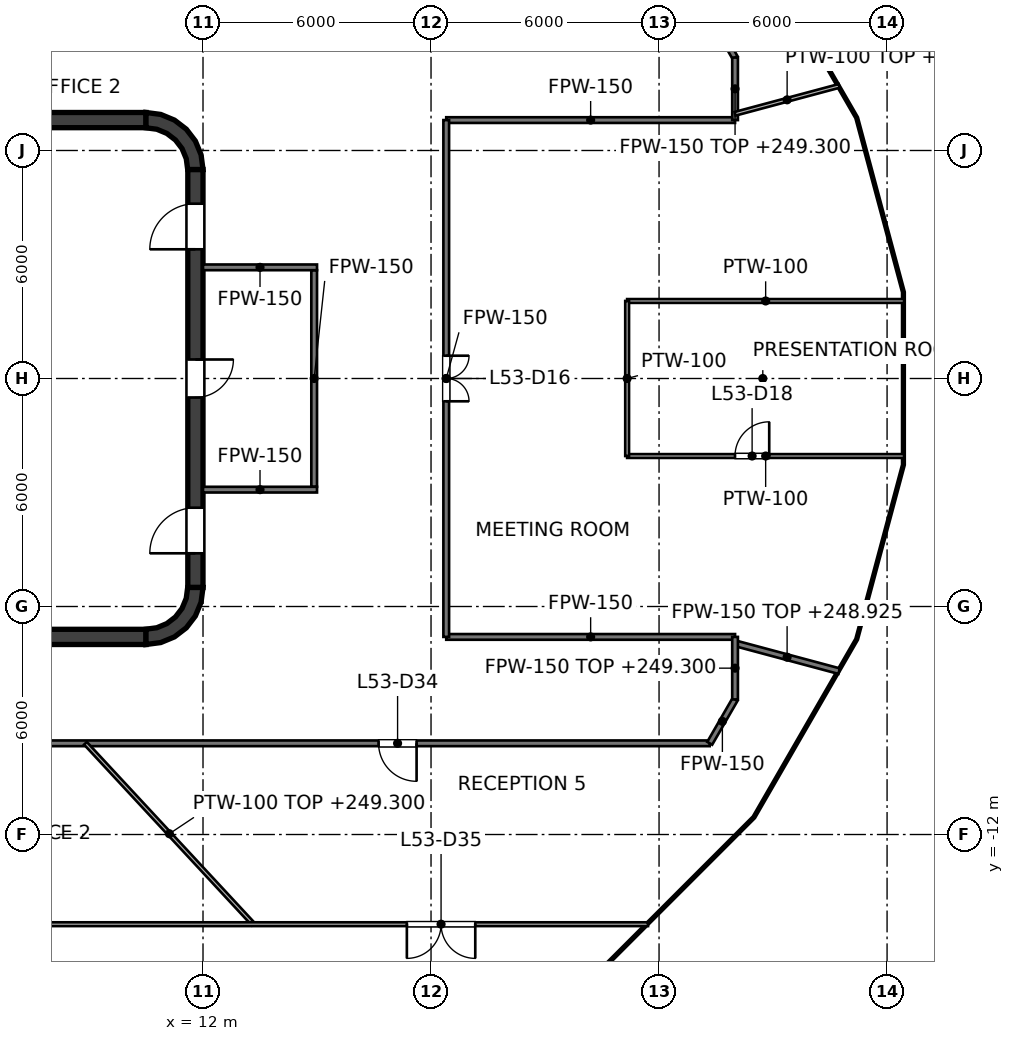
"""IFC4 building model, lengths in metres.
Left out: names, types, materials, properties, quantities, classifications, styles, units other than length and angle.
Written with IfcOpenShell. Run it as: python <this file> out.ifc"""

import sys

from ifc_helpers import new_model, si_unit, direction, frame, frame_2d, origin, place, context, subcontext, project, spatial, polyline, rectangle, outline, extrude, element, fill, save


model = new_model("IFC4")
c1 = context("Model", 3, precision=1e-05, world=origin(), true_north=direction((0.0, 1.0)))
c2 = subcontext(c1, "Body", "Model", "MODEL_VIEW")
j1 = project(units=[si_unit("LENGTHUNIT", "METRE"), si_unit("PLANEANGLEUNIT", "RADIAN")], contexts=[c1])
p1 = place(None, origin())
s1 = spatial("IfcSite", under=j1, at=p1, CompositionType="ELEMENT")
p2 = place(p1, origin())
s2 = spatial("IfcBuilding", under=s1, at=p2, CompositionType="ELEMENT")
p3 = place(p2, frame((0.0, 0.0, 245.6)))
s3 = spatial("IfcBuildingStorey", under=s2, at=p3, CompositionType="ELEMENT", Elevation=245.6)
for number, where, z_axis, x_axis in (
    (1, (-10.5, 6.8, 0.0), (0.0, 0.0, 1.0), (1.0, 0.0, 0.0)),
    (2, (-10.5, -6.8, 0.0), (0.0, 0.0, 1.0), (1.0, 0.0, 0.0)),
):
    element("IfcWall", number, at=place(p3, frame(where, z_axis=z_axis, x_axis=x_axis)), inside=s3, PredefinedType="SHEAR", context=c2, shape_type="SweptSolid", body=[
        extrude(rectangle(XDim=21.0, YDim=0.4, at=frame_2d((10.5, 0.0))), origin(), (0.0, 0.0, 1.0), 4.0),
    ])
p4 = place(p3, frame((11.8, -5.5, 0.0), z_axis=(0.0, 0.0, 1.0), x_axis=(0.0, 1.0, 0.0)))
e3 = element("IfcWall", 3, at=p4, inside=s3, PredefinedType="SHEAR", context=c2, shape_type="SweptSolid", body=[
    extrude(rectangle(XDim=11.0, YDim=0.4, at=frame_2d((5.5, 0.0))), origin(), (0.0, 0.0, 1.0), 4.0),
])
p5 = place(p4, frame((5.0, 0.0, 0.0)))
e4 = element("IfcOpeningElement", 4, at=p5, cuts=e3, PredefinedType="OPENING", context=c2, shape_type="SweptSolid", body=[
    extrude(rectangle(XDim=1.0, YDim=2.1, at=frame_2d((0.5, 1.05))), frame((0.0, 0.2, 0.0), z_axis=(0.0, -1.0, 0.0), x_axis=(1.0, 0.0, 0.0)), (0.0, 0.0, 1.0), 0.4),
])
p6 = place(p4, frame((0.9, 0.0, 0.0)))
e5 = element("IfcOpeningElement", 5, at=p6, cuts=e3, PredefinedType="OPENING", context=c2, shape_type="SweptSolid", body=[
    extrude(rectangle(XDim=1.2, YDim=2.1, at=frame_2d((0.6, 1.05))), frame((0.0, 0.2, 0.0), z_axis=(0.0, -1.0, 0.0), x_axis=(1.0, 0.0, 0.0)), (0.0, 0.0, 1.0), 0.4),
])
p7 = place(p4, frame((8.9, 0.0, 0.0)))
e6 = element("IfcOpeningElement", 6, at=p7, cuts=e3, PredefinedType="OPENING", context=c2, shape_type="SweptSolid", body=[
    extrude(rectangle(XDim=1.2, YDim=2.1, at=frame_2d((0.6, 1.05))), frame((0.0, 0.2, 0.0), z_axis=(0.0, -1.0, 0.0), x_axis=(1.0, 0.0, 0.0)), (0.0, 0.0, 1.0), 0.4),
])
p8 = place(p3, origin())
e7 = element("IfcWall", 7, at=p8, inside=s3, PredefinedType="SHEAR", context=c2, shape_type="SweptSolid", body=[
    extrude(outline(polyline([(10.5, 7.0), (10.5, 6.596), (10.784, 6.559), (11.048, 6.45), (11.275, 6.275), (11.45, 6.048), (11.559, 5.784), (11.596, 5.5), (12.0, 5.5), (11.949, 5.888), (11.799, 6.25), (11.561, 6.561), (11.25, 6.799), (10.888, 6.949), (10.5, 7.0)])), origin(), (0.0, 0.0, 1.0), 4.0),
])
e8 = element("IfcWall", 8, at=p8, inside=s3, PredefinedType="SHEAR", context=c2, shape_type="SweptSolid", body=[
    extrude(outline(polyline([(12.0, -5.5), (11.596, -5.5), (11.559, -5.784), (11.45, -6.048), (11.275, -6.275), (11.048, -6.45), (10.784, -6.559), (10.5, -6.596), (10.5, -7.0), (10.888, -6.949), (11.25, -6.799), (11.561, -6.561), (11.799, -6.25), (11.949, -5.888), (12.0, -5.5)])), origin(), (0.0, 0.0, 1.0), 4.0),
])
p9 = place(p3, frame((9.0, 4.1, 0.0), z_axis=(0.0, 0.0, 1.0), x_axis=(0.0, 1.0, 0.0)))
e9 = element("IfcWall", 9, at=p9, inside=s3, PredefinedType="SOLIDWALL", context=c2, shape_type="SweptSolid", body=[
    extrude(rectangle(XDim=2.5, YDim=0.25, at=frame_2d((1.25, 0.0))), origin(), (0.0, 0.0, 1.0), 3.7),
])
p10 = place(p9, frame((0.65, 0.0, 0.0)))
e10 = element("IfcOpeningElement", 10, at=p10, cuts=e9, PredefinedType="OPENING", context=c2, shape_type="SweptSolid", body=[
    extrude(rectangle(XDim=1.2, YDim=2.1, at=frame_2d((0.6, 1.05))), frame((0.0, 0.125, 0.0), z_axis=(0.0, -1.0, 0.0), x_axis=(1.0, 0.0, 0.0)), (0.0, 0.0, 1.0), 0.25),
])
p11 = place(p3, frame((9.0, -6.6, 0.0), z_axis=(0.0, 0.0, 1.0), x_axis=(0.0, 1.0, 0.0)))
e11 = element("IfcWall", 11, at=p11, inside=s3, PredefinedType="SOLIDWALL", context=c2, shape_type="SweptSolid", body=[
    extrude(rectangle(XDim=2.5, YDim=0.25, at=frame_2d((1.25, 0.0))), origin(), (0.0, 0.0, 1.0), 3.7),
])
p12 = place(p11, frame((0.65, 0.0, 0.0)))
e12 = element("IfcOpeningElement", 12, at=p12, cuts=e11, PredefinedType="OPENING", context=c2, shape_type="SweptSolid", body=[
    extrude(rectangle(XDim=1.2, YDim=2.1, at=frame_2d((0.6, 1.05))), frame((0.0, 0.125, 0.0), z_axis=(0.0, -1.0, 0.0), x_axis=(1.0, 0.0, 0.0)), (0.0, 0.0, 1.0), 0.25),
])
p13 = place(p3, frame((0.775, 1.525, 0.0), z_axis=(0.0, 0.0, 1.0), x_axis=(1.0, 0.0, 0.0)))
e13 = element("IfcWall", 13, at=p13, inside=s3, PredefinedType="SOLIDWALL", context=c2, shape_type="SweptSolid", body=[
    extrude(rectangle(XDim=8.35, YDim=0.25, at=frame_2d((4.175, 0.0))), origin(), (0.0, 0.0, 1.0), 3.7),
])
p14 = place(p13, frame((0.925, 0.0, 0.0)))
e14 = element("IfcOpeningElement", 14, at=p14, cuts=e13, PredefinedType="OPENING", context=c2, shape_type="SweptSolid", body=[
    extrude(rectangle(XDim=1.1, YDim=2.1, at=frame_2d((0.55, 1.05))), frame((0.0, 0.125, 0.0), z_axis=(0.0, -1.0, 0.0), x_axis=(1.0, 0.0, 0.0)), (0.0, 0.0, 1.0), 0.25),
])
p15 = place(p13, frame((3.625, 0.0, 0.0)))
e15 = element("IfcOpeningElement", 15, at=p15, cuts=e13, PredefinedType="OPENING", context=c2, shape_type="SweptSolid", body=[
    extrude(rectangle(XDim=1.1, YDim=2.1, at=frame_2d((0.55, 1.05))), frame((0.0, 0.125, 0.0), z_axis=(0.0, -1.0, 0.0), x_axis=(1.0, 0.0, 0.0)), (0.0, 0.0, 1.0), 0.25),
])
p16 = place(p13, frame((6.325, 0.0, 0.0)))
e16 = element("IfcOpeningElement", 16, at=p16, cuts=e13, PredefinedType="OPENING", context=c2, shape_type="SweptSolid", body=[
    extrude(rectangle(XDim=1.1, YDim=2.1, at=frame_2d((0.55, 1.05))), frame((0.0, 0.125, 0.0), z_axis=(0.0, -1.0, 0.0), x_axis=(1.0, 0.0, 0.0)), (0.0, 0.0, 1.0), 0.25),
])
p17 = place(p3, frame((0.775, 3.975, 0.0), z_axis=(0.0, 0.0, 1.0), x_axis=(1.0, 0.0, 0.0)))
e17 = element("IfcWall", 17, at=p17, inside=s3, PredefinedType="SOLIDWALL", context=c2, shape_type="SweptSolid", body=[
    extrude(rectangle(XDim=8.35, YDim=0.25, at=frame_2d((4.175, 0.0))), origin(), (0.0, 0.0, 1.0), 3.7),
])
p18 = place(p3, frame((9.0, 1.65, 0.0), z_axis=(0.0, 0.0, 1.0), x_axis=(0.0, 1.0, 0.0)))
e18 = element("IfcWall", 18, at=p18, inside=s3, PredefinedType="SOLIDWALL", context=c2, shape_type="SweptSolid", body=[
    extrude(rectangle(XDim=2.2, YDim=0.25, at=frame_2d((1.1, 0.0))), origin(), (0.0, 0.0, 1.0), 3.7),
])
p19 = place(p3, frame((-9.125, -1.525, 0.0), z_axis=(0.0, 0.0, 1.0), x_axis=(1.0, 0.0, 0.0)))
e19 = element("IfcWall", 19, at=p19, inside=s3, PredefinedType="SOLIDWALL", context=c2, shape_type="SweptSolid", body=[
    extrude(rectangle(XDim=18.25, YDim=0.25, at=frame_2d((9.125, 0.0))), origin(), (0.0, 0.0, 1.0), 3.7),
])
p20 = place(p19, frame((7.15, 0.0, 0.0)))
e20 = element("IfcOpeningElement", 20, at=p20, cuts=e19, PredefinedType="OPENING", context=c2, shape_type="SweptSolid", body=[
    extrude(rectangle(XDim=1.2, YDim=2.1, at=frame_2d((0.6, 1.05))), frame((0.0, 0.125, 0.0), z_axis=(0.0, -1.0, 0.0), x_axis=(1.0, 0.0, 0.0)), (0.0, 0.0, 1.0), 0.25),
])
p21 = place(p19, frame((10.2, 0.0, 0.0)))
e21 = element("IfcOpeningElement", 21, at=p21, cuts=e19, PredefinedType="OPENING", context=c2, shape_type="SweptSolid", body=[
    extrude(rectangle(XDim=1.2, YDim=2.1, at=frame_2d((0.6, 1.05))), frame((0.0, 0.125, 0.0), z_axis=(0.0, -1.0, 0.0), x_axis=(1.0, 0.0, 0.0)), (0.0, 0.0, 1.0), 0.25),
])
p22 = place(p19, frame((16.075, 0.0, 0.0)))
e22 = element("IfcOpeningElement", 22, at=p22, cuts=e19, PredefinedType="OPENING", context=c2, shape_type="SweptSolid", body=[
    extrude(rectangle(XDim=1.0, YDim=2.1, at=frame_2d((0.5, 1.05))), frame((0.0, 0.125, 0.0), z_axis=(0.0, -1.0, 0.0), x_axis=(1.0, 0.0, 0.0)), (0.0, 0.0, 1.0), 0.25),
])
p23 = place(p3, frame((3.275, -3.975, 0.0), z_axis=(0.0, 0.0, 1.0), x_axis=(1.0, 0.0, 0.0)))
e23 = element("IfcWall", 23, at=p23, inside=s3, PredefinedType="SOLIDWALL", context=c2, shape_type="SweptSolid", body=[
    extrude(rectangle(XDim=5.85, YDim=0.25, at=frame_2d((2.925, 0.0))), origin(), (0.0, 0.0, 1.0), 3.7),
])
p24 = place(p3, frame((9.0, -3.85, 0.0), z_axis=(0.0, 0.0, 1.0), x_axis=(0.0, 1.0, 0.0)))
e24 = element("IfcWall", 24, at=p24, inside=s3, PredefinedType="SOLIDWALL", context=c2, shape_type="SweptSolid", body=[
    extrude(rectangle(XDim=2.2, YDim=0.25, at=frame_2d((1.1, 0.0))), origin(), (0.0, 0.0, 1.0), 3.7),
])
p25 = place(p3, frame((14.925, -2.85, 0.0), z_axis=(0.0, 0.0, 1.0), x_axis=(0.0, 1.0, 0.0)))
e25 = element("IfcWall", 25, at=p25, inside=s3, PredefinedType="PARTITIONING", context=c2, shape_type="SweptSolid", body=[
    extrude(rectangle(XDim=5.7, YDim=0.15, at=frame_2d((2.85, 0.0))), origin(), (0.0, 0.0, 1.0), 2.768),
])
for number, where, z_axis, x_axis in (
    (26, (12.0, 2.925, 0.0), (0.0, 0.0, 1.0), (1.0, 0.0, 0.0)),
    (27, (12.0, -2.925, 0.0), (0.0, 0.0, 1.0), (1.0, 0.0, 0.0)),
):
    element("IfcWall", number, at=place(p3, frame(where, z_axis=z_axis, x_axis=x_axis)), inside=s3, PredefinedType="PARTITIONING", context=c2, shape_type="SweptSolid", body=[
        extrude(rectangle(XDim=3.0, YDim=0.15, at=frame_2d((1.5, 0.0))), origin(), (0.0, 0.0, 1.0), 2.768),
    ])
p26 = place(p3, frame((25.333, 9.6, 0.0), z_axis=(0.0, 0.0, 1.0), x_axis=(0.500076310463, -0.865981341435, 0.0)))
e28 = element("IfcWall", 28, at=p26, inside=s3, PredefinedType="PARTITIONING", context=c2, shape_type="SweptSolid", body=[
    extrude(rectangle(XDim=1.334, YDim=0.15, at=frame_2d((0.667, 0.0))), origin(), (0.0, 0.0, 1.0), 2.768),
])
p27 = place(p3, frame((26.0, -6.967, 0.0), z_axis=(0.0, 0.0, 1.0), x_axis=(0.965928451997, -0.258809245628, 0.0)))
e29 = element("IfcWall", 29, at=p27, inside=s3, PredefinedType="PARTITIONING", context=c2, shape_type="SweptSolid", body=[
    extrude(rectangle(XDim=2.836, YDim=0.15, at=frame_2d((1.418, 0.0))), origin(), (0.0, 0.0, 1.0), 3.325),
])
p28 = place(p3, frame((-25.333, -9.6, 0.0), z_axis=(0.0, 0.0, 1.0), x_axis=(1.0, 0.0, 0.0)))
e30 = element("IfcWall", 30, at=p28, inside=s3, PredefinedType="PARTITIONING", context=c2, shape_type="SweptSolid", body=[
    extrude(rectangle(XDim=50.666, YDim=0.15, at=frame_2d((25.333, 0.0))), origin(), (0.0, 0.0, 1.0), 2.768),
])
p29 = place(p28, frame((4.956, 0.0, 0.0)))
e31 = element("IfcOpeningElement", 31, at=p29, cuts=e30, PredefinedType="OPENING", context=c2, shape_type="SweptSolid", body=[
    extrude(rectangle(XDim=1.0, YDim=2.1, at=frame_2d((0.5, 1.05))), frame((0.0, 0.075, 0.0), z_axis=(0.0, -1.0, 0.0), x_axis=(1.0, 0.0, 0.0)), (0.0, 0.0, 1.0), 0.15),
])
p30 = place(p28, frame((12.016, 0.0, 0.0)))
e32 = element("IfcOpeningElement", 32, at=p30, cuts=e30, PredefinedType="OPENING", context=c2, shape_type="SweptSolid", body=[
    extrude(rectangle(XDim=1.0, YDim=2.1, at=frame_2d((0.5, 1.05))), frame((0.0, 0.075, 0.0), z_axis=(0.0, -1.0, 0.0), x_axis=(1.0, 0.0, 0.0)), (0.0, 0.0, 1.0), 0.15),
])
p31 = place(p28, frame((18.068, 0.0, 0.0)))
e33 = element("IfcOpeningElement", 33, at=p31, cuts=e30, PredefinedType="OPENING", context=c2, shape_type="SweptSolid", body=[
    extrude(rectangle(XDim=1.0, YDim=2.1, at=frame_2d((0.5, 1.05))), frame((0.0, 0.075, 0.0), z_axis=(0.0, -1.0, 0.0), x_axis=(1.0, 0.0, 0.0)), (0.0, 0.0, 1.0), 0.15),
])
p32 = place(p28, frame((22.521, 0.0, 0.0)))
e34 = element("IfcOpeningElement", 34, at=p32, cuts=e30, PredefinedType="OPENING", context=c2, shape_type="SweptSolid", body=[
    extrude(rectangle(XDim=1.0, YDim=2.1, at=frame_2d((0.5, 1.05))), frame((0.0, 0.075, 0.0), z_axis=(0.0, -1.0, 0.0), x_axis=(1.0, 0.0, 0.0)), (0.0, 0.0, 1.0), 0.15),
])
p33 = place(p28, frame((26.665, 0.0, 0.0)))
e35 = element("IfcOpeningElement", 35, at=p33, cuts=e30, PredefinedType="OPENING", context=c2, shape_type="SweptSolid", body=[
    extrude(rectangle(XDim=1.0, YDim=2.1, at=frame_2d((0.5, 1.05))), frame((0.0, 0.075, 0.0), z_axis=(0.0, -1.0, 0.0), x_axis=(1.0, 0.0, 0.0)), (0.0, 0.0, 1.0), 0.15),
])
p34 = place(p28, frame((31.12, 0.0, 0.0)))
e36 = element("IfcOpeningElement", 36, at=p34, cuts=e30, PredefinedType="OPENING", context=c2, shape_type="SweptSolid", body=[
    extrude(rectangle(XDim=1.0, YDim=2.1, at=frame_2d((0.5, 1.05))), frame((0.0, 0.075, 0.0), z_axis=(0.0, -1.0, 0.0), x_axis=(1.0, 0.0, 0.0)), (0.0, 0.0, 1.0), 0.15),
])
p35 = place(p28, frame((41.953, 0.0, 0.0)))
e37 = element("IfcOpeningElement", 37, at=p35, cuts=e30, PredefinedType="OPENING", context=c2, shape_type="SweptSolid", body=[
    extrude(rectangle(XDim=1.0, YDim=2.1, at=frame_2d((0.5, 1.05))), frame((0.0, 0.075, 0.0), z_axis=(0.0, -1.0, 0.0), x_axis=(1.0, 0.0, 0.0)), (0.0, 0.0, 1.0), 0.15),
])
for number, where, z_axis, x_axis in (
    (38, (18.4, -6.8, 0.0), (0.0, 0.0, 1.0), (1.0, 0.0, 0.0)),
    (39, (18.4, 6.8, 0.0), (0.0, 0.0, 1.0), (1.0, 0.0, 0.0)),
):
    element("IfcWall", number, at=place(p3, frame(where, z_axis=z_axis, x_axis=x_axis)), inside=s3, PredefinedType="PARTITIONING", context=c2, shape_type="SweptSolid", body=[
        extrude(rectangle(XDim=7.6, YDim=0.15, at=frame_2d((3.8, 0.0))), origin(), (0.0, 0.0, 1.0), 2.768),
    ])
p36 = place(p3, frame((25.333, -9.6, 0.0), z_axis=(0.0, 0.0, 1.0), x_axis=(0.500076310463, 0.865981341435, 0.0)))
e40 = element("IfcWall", 40, at=p36, inside=s3, PredefinedType="PARTITIONING", context=c2, shape_type="SweptSolid", body=[
    extrude(rectangle(XDim=1.334, YDim=0.15, at=frame_2d((0.667, 0.0))), origin(), (0.0, 0.0, 1.0), 2.768),
])
for number, where, z_axis, x_axis in (
    (41, (26.0, -8.445, 0.0), (0.0, 0.0, 1.0), (0.0, 1.0, 0.0)),
    (42, (26.0, 6.8, 0.0), (0.0, 0.0, 1.0), (0.0, 1.0, 0.0)),
):
    element("IfcWall", number, at=place(p3, frame(where, z_axis=z_axis, x_axis=x_axis)), inside=s3, PredefinedType="PARTITIONING", context=c2, shape_type="SweptSolid", body=[
        extrude(rectangle(XDim=1.645, YDim=0.15, at=frame_2d((0.823, 0.0))), origin(), (0.0, 0.0, 1.0), 3.7),
    ])
p37 = place(p3, frame((18.4, -6.8, 0.0), z_axis=(0.0, 0.0, 1.0), x_axis=(0.0, 1.0, 0.0)))
e43 = element("IfcWall", 43, at=p37, inside=s3, PredefinedType="PARTITIONING", context=c2, shape_type="SweptSolid", body=[
    extrude(rectangle(XDim=13.6, YDim=0.15, at=frame_2d((6.8, 0.0))), origin(), (0.0, 0.0, 1.0), 2.768),
])
p38 = place(p37, frame((6.2, 0.0, 0.0)))
e44 = element("IfcOpeningElement", 44, at=p38, cuts=e43, PredefinedType="OPENING", context=c2, shape_type="SweptSolid", body=[
    extrude(rectangle(XDim=1.2, YDim=2.1, at=frame_2d((0.6, 1.05))), frame((0.0, 0.075, 0.0), z_axis=(0.0, -1.0, 0.0), x_axis=(1.0, 0.0, 0.0)), (0.0, 0.0, 1.0), 0.15),
])
p39 = place(p3, frame((8.907, -9.6, 0.0), z_axis=(0.0, 0.0, 1.0), x_axis=(0.680201581888, -0.733025107344, 0.0)))
e45 = element("IfcWall", 45, at=p39, inside=s3, PredefinedType="PARTITIONING", context=c2, shape_type="SweptSolid", body=[
    extrude(rectangle(XDim=6.494, YDim=0.1, at=frame_2d((3.247, 0.0))), origin(), (0.0, 0.0, 1.0), 3.7),
])
p40 = place(p3, frame((-23.71, -14.36, 0.0), z_axis=(0.0, 0.0, 1.0), x_axis=(1.0, 0.0, 0.0)))
e46 = element("IfcWall", 46, at=p40, inside=s3, PredefinedType="PARTITIONING", context=c2, shape_type="SweptSolid", body=[
    extrude(rectangle(XDim=47.42, YDim=0.1, at=frame_2d((23.71, 0.0))), origin(), (0.0, 0.0, 1.0), 2.768),
])
p41 = place(p40, frame((19.302, 0.0, 0.0)))
e47 = element("IfcOpeningElement", 47, at=p41, cuts=e46, PredefinedType="OPENING", context=c2, shape_type="SweptSolid", body=[
    extrude(rectangle(XDim=1.8, YDim=2.1, at=frame_2d((0.9, 1.05))), frame((0.0, 0.05, 0.0), z_axis=(0.0, -1.0, 0.0), x_axis=(1.0, 0.0, 0.0)), (0.0, 0.0, 1.0), 0.1),
])
p42 = place(p40, frame((41.074, 0.0, 0.0)))
e48 = element("IfcOpeningElement", 48, at=p42, cuts=e46, PredefinedType="OPENING", context=c2, shape_type="SweptSolid", body=[
    extrude(rectangle(XDim=1.8, YDim=2.1, at=frame_2d((0.9, 1.05))), frame((0.0, 0.05, 0.0), z_axis=(0.0, -1.0, 0.0), x_axis=(1.0, 0.0, 0.0)), (0.0, 0.0, 1.0), 0.1),
])
p43 = place(p3, frame((23.16, -2.04, 0.0), z_axis=(0.0, 0.0, 1.0), x_axis=(1.0, 0.0, 0.0)))
e49 = element("IfcWall", 49, at=p43, inside=s3, PredefinedType="PARTITIONING", context=c2, shape_type="SweptSolid", body=[
    extrude(rectangle(XDim=7.29, YDim=0.1, at=frame_2d((3.645, 0.0))), origin(), (0.0, 0.0, 1.0), 2.768),
])
p44 = place(p43, frame((2.839, 0.0, 0.0)))
e50 = element("IfcOpeningElement", 50, at=p44, cuts=e49, PredefinedType="OPENING", context=c2, shape_type="SweptSolid", body=[
    extrude(rectangle(XDim=0.9, YDim=2.1, at=frame_2d((0.45, 1.05))), frame((0.0, 0.05, 0.0), z_axis=(0.0, -1.0, 0.0), x_axis=(1.0, 0.0, 0.0)), (0.0, 0.0, 1.0), 0.1),
])
p45 = place(p3, frame((23.16, 2.04, 0.0), z_axis=(0.0, 0.0, 1.0), x_axis=(1.0, 0.0, 0.0)))
e51 = element("IfcWall", 51, at=p45, inside=s3, PredefinedType="PARTITIONING", context=c2, shape_type="SweptSolid", body=[
    extrude(rectangle(XDim=7.29, YDim=0.1, at=frame_2d((3.645, 0.0))), origin(), (0.0, 0.0, 1.0), 2.768),
])
p46 = place(p3, frame((26.0, 6.966, 0.0), z_axis=(0.0, 0.0, 1.0), x_axis=(0.965951508514, 0.258723178704, 0.0)))
e52 = element("IfcWall", 52, at=p46, inside=s3, PredefinedType="PARTITIONING", context=c2, shape_type="SweptSolid", body=[
    extrude(rectangle(XDim=2.837, YDim=0.1, at=frame_2d((1.418, 0.0))), origin(), (0.0, 0.0, 1.0), 3.325),
])
p47 = place(p3, frame((23.16, -2.04, 0.0), z_axis=(0.0, 0.0, 1.0), x_axis=(0.0, 1.0, 0.0)))
e53 = element("IfcWall", 53, at=p47, inside=s3, PredefinedType="PARTITIONING", context=c2, shape_type="SweptSolid", body=[
    extrude(rectangle(XDim=4.08, YDim=0.1, at=frame_2d((2.04, 0.0))), origin(), (0.0, 0.0, 1.0), 2.768),
])
p48 = place(p16, origin())
e54 = element("IfcDoor", 54, at=p48, inside=s3, OperationType="DOUBLE_DOOR_SLIDING", PredefinedType="DOOR", context=c2, shape_type="SweptSolid", body=[
    extrude(rectangle(XDim=1.1, YDim=2.1, at=frame_2d((0.55, 1.05))), frame((0.0, 0.025, 0.0), z_axis=(0.0, -1.0, 0.0), x_axis=(1.0, 0.0, 0.0)), (0.0, 0.0, 1.0), 0.05),
])
fill(e16, e54)
p49 = place(p10, origin())
e55 = element("IfcDoor", 55, at=p49, inside=s3, OperationType="SINGLE_SWING_LEFT", PredefinedType="DOOR", context=c2, shape_type="SweptSolid", body=[
    extrude(rectangle(XDim=1.2, YDim=2.1, at=frame_2d((0.6, 1.05))), frame((0.0, 0.025, 0.0), z_axis=(0.0, -1.0, 0.0), x_axis=(1.0, 0.0, 0.0)), (0.0, 0.0, 1.0), 0.05),
])
fill(e10, e55)
p50 = place(p12, origin())
e56 = element("IfcDoor", 56, at=p50, inside=s3, OperationType="SINGLE_SWING_LEFT", PredefinedType="DOOR", context=c2, shape_type="SweptSolid", body=[
    extrude(rectangle(XDim=1.2, YDim=2.1, at=frame_2d((0.6, 1.05))), frame((0.0, 0.025, 0.0), z_axis=(0.0, -1.0, 0.0), x_axis=(1.0, 0.0, 0.0)), (0.0, 0.0, 1.0), 0.05),
])
fill(e12, e56)
p51 = place(p5, origin())
e57 = element("IfcDoor", 57, at=p51, inside=s3, OperationType="SINGLE_SWING_RIGHT", PredefinedType="DOOR", context=c2, shape_type="SweptSolid", body=[
    extrude(rectangle(XDim=1.0, YDim=2.1, at=frame_2d((0.5, 1.05))), frame((0.0, 0.025, 0.0), z_axis=(0.0, -1.0, 0.0), x_axis=(1.0, 0.0, 0.0)), (0.0, 0.0, 1.0), 0.05),
])
fill(e4, e57)
p52 = place(p6, origin())
e58 = element("IfcDoor", 58, at=p52, inside=s3, OperationType="SINGLE_SWING_LEFT", PredefinedType="DOOR", context=c2, shape_type="SweptSolid", body=[
    extrude(rectangle(XDim=1.2, YDim=2.1, at=frame_2d((0.6, 1.05))), frame((0.0, 0.025, 0.0), z_axis=(0.0, -1.0, 0.0), x_axis=(1.0, 0.0, 0.0)), (0.0, 0.0, 1.0), 0.05),
])
fill(e5, e58)
p53 = place(p7, origin())
e59 = element("IfcDoor", 59, at=p53, inside=s3, OperationType="SINGLE_SWING_LEFT", PredefinedType="DOOR", context=c2, shape_type="SweptSolid", body=[
    extrude(rectangle(XDim=1.2, YDim=2.1, at=frame_2d((0.6, 1.05))), frame((0.0, 0.025, 0.0), z_axis=(0.0, -1.0, 0.0), x_axis=(1.0, 0.0, 0.0)), (0.0, 0.0, 1.0), 0.05),
])
fill(e6, e59)
p54 = place(p38, origin())
e60 = element("IfcDoor", 60, at=p54, inside=s3, OperationType="DOUBLE_DOOR_SINGLE_SWING", PredefinedType="DOOR", context=c2, shape_type="SweptSolid", body=[
    extrude(rectangle(XDim=1.2, YDim=2.1, at=frame_2d((0.6, 1.05))), frame((0.0, 0.025, 0.0), z_axis=(0.0, -1.0, 0.0), x_axis=(1.0, 0.0, 0.0)), (0.0, 0.0, 1.0), 0.05),
])
fill(e44, e60)
p55 = place(p44, origin())
e61 = element("IfcDoor", 61, at=p55, inside=s3, OperationType="SINGLE_SWING_RIGHT", PredefinedType="DOOR", context=c2, shape_type="SweptSolid", body=[
    extrude(rectangle(XDim=0.9, YDim=2.1, at=frame_2d((0.45, 1.05))), frame((0.0, 0.025, 0.0), z_axis=(0.0, -1.0, 0.0), x_axis=(1.0, 0.0, 0.0)), (0.0, 0.0, 1.0), 0.05),
])
fill(e50, e61)
p56 = place(p35, origin())
e62 = element("IfcDoor", 62, at=p56, inside=s3, OperationType="SINGLE_SWING_RIGHT", PredefinedType="DOOR", context=c2, shape_type="SweptSolid", body=[
    extrude(rectangle(XDim=1.0, YDim=2.1, at=frame_2d((0.5, 1.05))), frame((0.0, 0.025, 0.0), z_axis=(0.0, -1.0, 0.0), x_axis=(1.0, 0.0, 0.0)), (0.0, 0.0, 1.0), 0.05),
])
fill(e37, e62)
p57 = place(p42, origin())
e63 = element("IfcDoor", 63, at=p57, inside=s3, OperationType="DOUBLE_DOOR_SINGLE_SWING", PredefinedType="DOOR", context=c2, shape_type="SweptSolid", body=[
    extrude(rectangle(XDim=1.8, YDim=2.1, at=frame_2d((0.9, 1.05))), frame((0.0, 0.025, 0.0), z_axis=(0.0, -1.0, 0.0), x_axis=(1.0, 0.0, 0.0)), (0.0, 0.0, 1.0), 0.05),
])
fill(e48, e63)
save(model, sys.argv[1])
